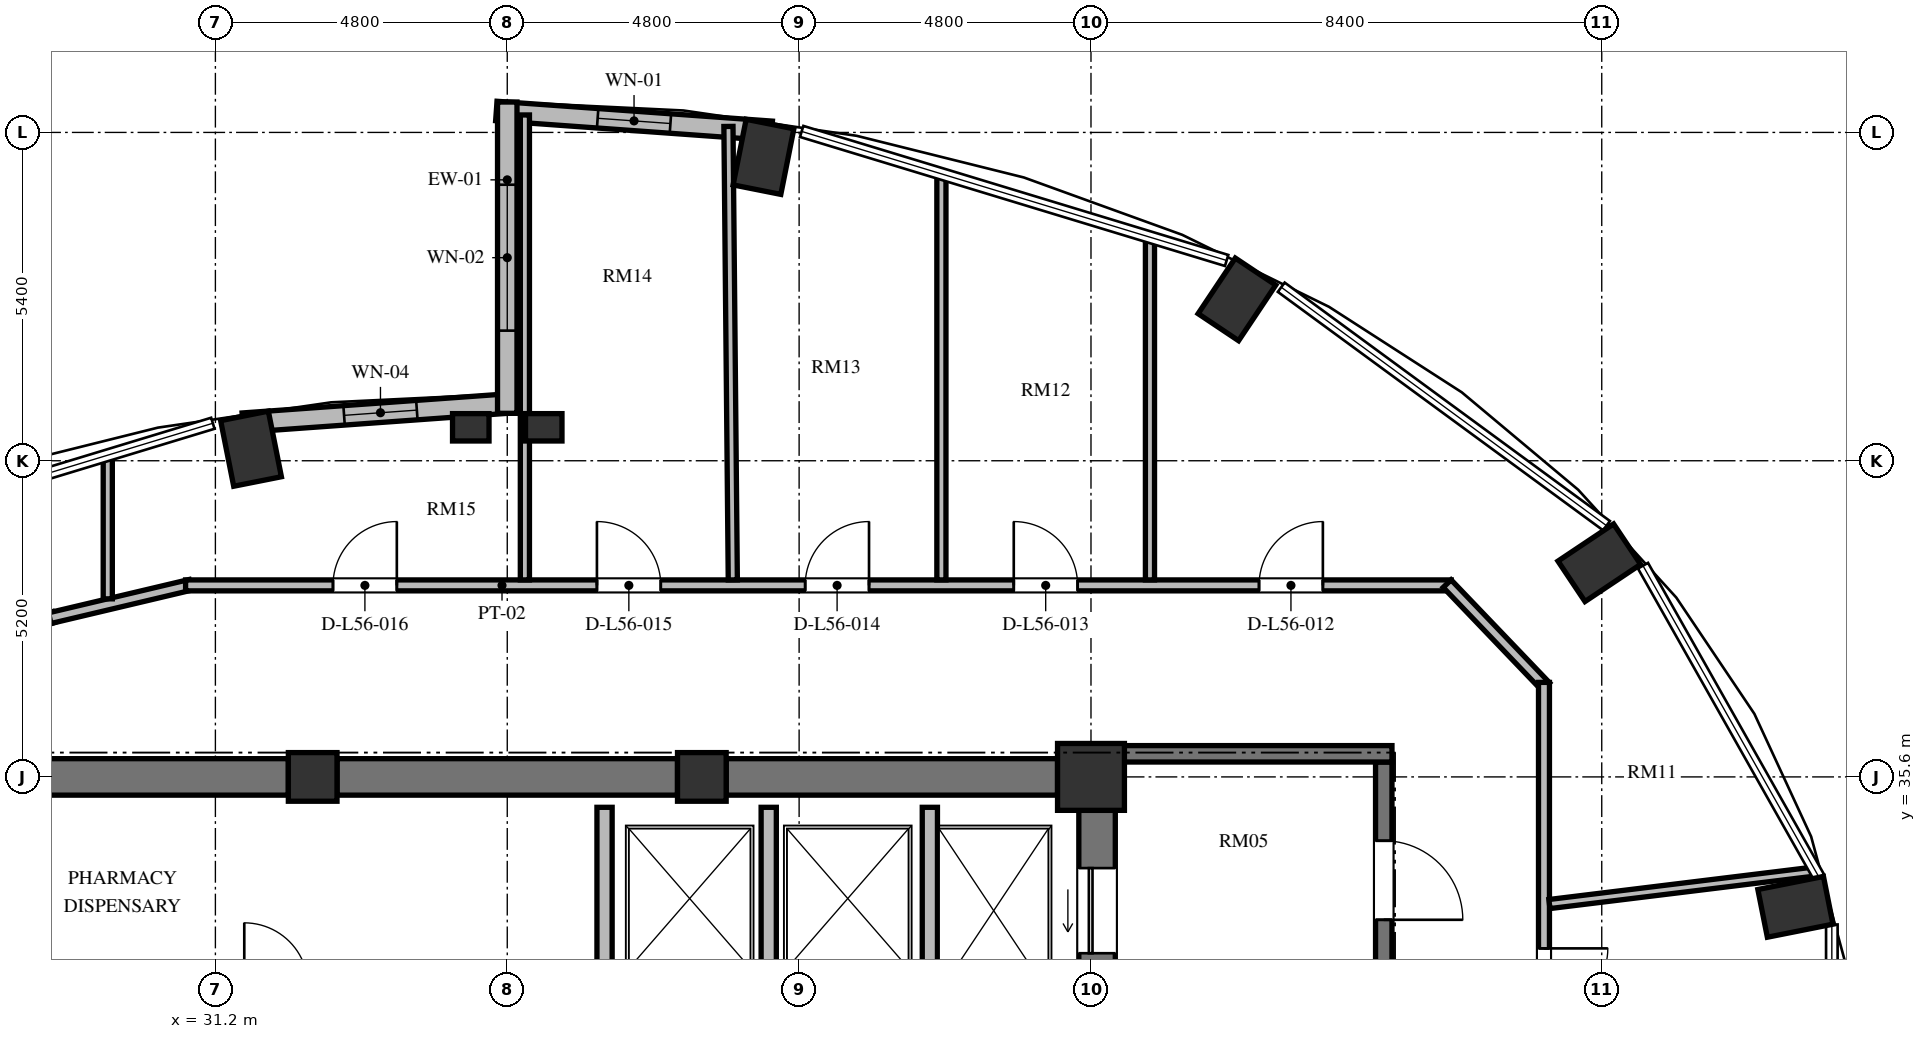
"""IFC4 building model, lengths in metres.
Left out: names, types, materials, properties, quantities, classifications, styles, units other than length and angle.
Written with IfcOpenShell. Run it as: python <this file> out.ifc"""

import sys

from ifc_helpers import new_model, si_unit, direction, frame, frame_2d, origin, origin_2d, place, context, subcontext, project, spatial, rectangle, extrude, element, fill, save


model = new_model("IFC4")
c1 = context("Model", 3, precision=1e-05, world=origin(), true_north=direction((0.0, 1.0)))
c2 = subcontext(c1, "Body", "Model", "MODEL_VIEW")
j1 = project(units=[si_unit("LENGTHUNIT", "METRE"), si_unit("PLANEANGLEUNIT", "RADIAN")], contexts=[c1])
p1 = place(None, origin())
s1 = spatial("IfcSite", under=j1, at=p1, CompositionType="ELEMENT")
p2 = place(p1, origin())
s2 = spatial("IfcBuilding", under=s1, at=p2, CompositionType="ELEMENT")
p3 = place(p2, frame((0.0, 0.0, 216.72)))
s3 = spatial("IfcBuildingStorey", under=s2, at=p3, CompositionType="ELEMENT", Elevation=216.72)
for number, where, z_axis, x_axis in (
    (1, (57.185, 33.463, 0.0), (0.0, 0.0, 1.0), (0.981, 0.195, 0.0)),
    (2, (53.96, 39.123, 0.0), (0.0, 0.0, 1.0), (0.831, 0.556, 0.0)),
    (3, (48.0, 43.454, 0.0), (0.0, 0.0, 1.0), (0.556, 0.831, 0.0)),
    (4, (40.214, 45.798, 0.0), (0.0, 0.0, 1.0), (0.195, 0.981, 0.0)),
    (5, (31.786, 40.998, 0.0), (0.0, 0.0, 1.0), (-0.195, 0.981, 0.0)),
):
    element("IfcColumn", number, at=place(p3, frame(where, z_axis=z_axis, x_axis=x_axis)), inside=s3, PredefinedType="COLUMN", context=c2, shape_type="SweptSolid", body=[
        extrude(rectangle(XDim=1.1, YDim=0.8, at=origin_2d()), origin(), (0.0, 0.0, 1.0), 3.648),
    ])
p4 = place(p3, frame((45.6, 35.6, 0.0), z_axis=(0.0, 0.0, 1.0), x_axis=(1.0, 0.0, 0.0)))
e6 = element("IfcColumn", 6, at=p4, inside=s3, PredefinedType="COLUMN", context=c2, shape_type="SweptSolid", body=[
    extrude(rectangle(XDim=1.1, YDim=1.1, at=origin_2d()), origin(), (0.0, 0.0, 1.0), 3.648),
])
for number, where, z_axis, x_axis in (
    (7, (39.2, 35.6, 0.0), (0.0, 0.0, 1.0), (1.0, 0.0, 0.0)),
    (8, (32.8, 35.6, 0.0), (0.0, 0.0, 1.0), (1.0, 0.0, 0.0)),
):
    element("IfcColumn", number, at=place(p3, frame(where, z_axis=z_axis, x_axis=x_axis)), inside=s3, PredefinedType="COLUMN", context=c2, shape_type="SweptSolid", body=[
        extrude(rectangle(XDim=0.8, YDim=0.8, at=origin_2d()), origin(), (0.0, 0.0, 1.0), 3.648),
    ])
for number, where, z_axis, x_axis in (
    (9, (35.4, 41.35, 0.0), (0.0, 0.0, 1.0), (1.0, 0.0, 0.0)),
    (10, (36.6, 41.35, 0.0), (0.0, 0.0, 1.0), (1.0, 0.0, 0.0)),
):
    element("IfcColumn", number, at=place(p3, frame(where, z_axis=z_axis, x_axis=x_axis)), inside=s3, PredefinedType="PILASTER", context=c2, shape_type="SweptSolid", body=[
        extrude(rectangle(XDim=0.6, YDim=0.45, at=origin_2d()), origin(), (0.0, 0.0, 1.0), 3.648),
    ])
p5 = place(p3, frame((45.7, 20.95, 0.0), z_axis=(0.0, 0.0, 1.0), x_axis=(0.0, 1.0, 0.0)))
e11 = element("IfcWall", 11, at=p5, inside=s3, PredefinedType="SHEAR", context=c2, shape_type="SweptSolid", body=[
    extrude(rectangle(XDim=14.1, YDim=0.6, at=frame_2d((7.05, 0.0))), origin(), (0.0, 0.0, 1.0), 3.648),
])
p6 = place(p5, frame((11.75, 0.0, 0.0)))
e12 = element("IfcOpeningElement", 12, at=p6, cuts=e11, PredefinedType="OPENING", context=c2, shape_type="SweptSolid", body=[
    extrude(rectangle(XDim=1.4, YDim=2.3, at=frame_2d((0.7, 1.15))), frame((0.0, 0.31, 0.0), z_axis=(0.0, -1.0, 0.0), x_axis=(1.0, 0.0, 0.0)), (0.0, 0.0, 1.0), 0.62),
])
p7 = place(p5, frame((0.95, 0.0, 0.0)))
e13 = element("IfcOpeningElement", 13, at=p7, cuts=e11, PredefinedType="OPENING", context=c2, shape_type="SweptSolid", body=[
    extrude(rectangle(XDim=1.4, YDim=2.3, at=frame_2d((0.7, 1.15))), frame((0.0, 0.31, 0.0), z_axis=(0.0, -1.0, 0.0), x_axis=(1.0, 0.0, 0.0)), (0.0, 0.0, 1.0), 0.62),
])
p8 = place(p3, frame((26.95, 35.6, 0.0), z_axis=(0.0, 0.0, 1.0), x_axis=(1.0, 0.0, 0.0)))
e14 = element("IfcWall", 14, at=p8, inside=s3, PredefinedType="SHEAR", context=c2, shape_type="SweptSolid", body=[
    extrude(rectangle(XDim=5.45, YDim=0.6, at=frame_2d((2.725, 0.0))), origin(), (0.0, 0.0, 1.0), 3.648),
])
p9 = place(p3, frame((33.2, 35.6, 0.0), z_axis=(0.0, 0.0, 1.0), x_axis=(1.0, 0.0, 0.0)))
e15 = element("IfcWall", 15, at=p9, inside=s3, PredefinedType="SHEAR", context=c2, shape_type="SweptSolid", body=[
    extrude(rectangle(XDim=5.6, YDim=0.6, at=frame_2d((2.8, 0.0))), origin(), (0.0, 0.0, 1.0), 3.648),
])
p10 = place(p3, frame((39.6, 35.6, 0.0), z_axis=(0.0, 0.0, 1.0), x_axis=(1.0, 0.0, 0.0)))
e16 = element("IfcWall", 16, at=p10, inside=s3, PredefinedType="SHEAR", context=c2, shape_type="SweptSolid", body=[
    extrude(rectangle(XDim=5.45, YDim=0.6, at=frame_2d((2.725, 0.0))), origin(), (0.0, 0.0, 1.0), 3.648),
])
p11 = place(p3, frame((40.35, 46.226, 0.0), z_axis=(0.0, 0.0, 1.0), x_axis=(-0.997409061056, 0.071938619141, 0.0)))
e17 = element("IfcWall", 17, at=p11, inside=s3, PredefinedType="SOLIDWALL", context=c2, shape_type="SweptSolid", body=[
    extrude(rectangle(XDim=4.541, YDim=0.32, at=frame_2d((2.271, 0.0))), origin(), (0.0, 0.0, 1.0), 3.448),
])
p12 = place(p11, frame((1.67, 0.0, 0.85)))
e18 = element("IfcOpeningElement", 18, at=p12, cuts=e17, PredefinedType="OPENING", context=c2, shape_type="SweptSolid", body=[
    extrude(rectangle(XDim=1.2, YDim=2.2, at=frame_2d((0.6, 1.1))), frame((0.0, 0.17, 0.0), z_axis=(0.0, -1.0, 0.0), x_axis=(1.0, 0.0, 0.0)), (0.0, 0.0, 1.0), 0.34),
])
p13 = place(p3, frame((36.179, 41.753, 0.0), z_axis=(0.0, 0.0, 1.0), x_axis=(-0.997408782787, -0.071942477163, 0.0)))
e19 = element("IfcWall", 19, at=p13, inside=s3, PredefinedType="SOLIDWALL", context=c2, shape_type="SweptSolid", body=[
    extrude(rectangle(XDim=4.541, YDim=0.32, at=frame_2d((2.27, 0.0))), origin(), (0.0, 0.0, 1.0), 3.448),
])
p14 = place(p13, frame((1.67, 0.0, 0.85)))
e20 = element("IfcOpeningElement", 20, at=p14, cuts=e19, PredefinedType="OPENING", context=c2, shape_type="SweptSolid", body=[
    extrude(rectangle(XDim=1.2, YDim=1.8, at=frame_2d((0.6, 0.9))), frame((0.0, 0.17, 0.0), z_axis=(0.0, -1.0, 0.0), x_axis=(1.0, 0.0, 0.0)), (0.0, 0.0, 1.0), 0.34),
])
p15 = place(p3, frame((36.0, 46.7, 0.0), z_axis=(0.0, 0.0, 1.0), x_axis=(0.0, -1.0, 0.0)))
e21 = element("IfcWall", 21, at=p15, inside=s3, PredefinedType="SOLIDWALL", context=c2, shape_type="SweptSolid", body=[
    extrude(rectangle(XDim=5.12, YDim=0.32, at=frame_2d((2.56, 0.0))), origin(), (0.0, 0.0, 1.0), 3.448),
])
p16 = place(p15, frame((1.36, 0.0, 0.84)))
e22 = element("IfcOpeningElement", 22, at=p16, cuts=e21, PredefinedType="OPENING", context=c2, shape_type="SweptSolid", body=[
    extrude(rectangle(XDim=2.4, YDim=2.04, at=frame_2d((1.2, 1.02))), frame((0.0, 0.17, 0.0), z_axis=(0.0, -1.0, 0.0), x_axis=(1.0, 0.0, 0.0)), (0.0, 0.0, 1.0), 0.34),
])
p17 = place(p3, frame((42.95, 31.92, 0.0), z_axis=(0.0, 0.0, 1.0), x_axis=(0.0, 1.0, 0.0)))
e23 = element("IfcWall", 23, at=p17, inside=s3, PredefinedType="SOLIDWALL", context=c2, shape_type="SweptSolid", body=[
    extrude(rectangle(XDim=3.18, YDim=0.25, at=frame_2d((1.59, 0.0))), origin(), (0.0, 0.0, 1.0), 3.448),
])
for number, where, z_axis, x_axis in (
    (24, (37.6, 32.42, 0.0), (0.0, 0.0, 1.0), (0.0, 1.0, 0.0)),
    (25, (40.3, 32.42, 0.0), (0.0, 0.0, 1.0), (0.0, 1.0, 0.0)),
):
    element("IfcWall", number, at=place(p3, frame(where, z_axis=z_axis, x_axis=x_axis)), inside=s3, PredefinedType="SOLIDWALL", context=c2, shape_type="SweptSolid", body=[
        extrude(rectangle(XDim=2.68, YDim=0.25, at=frame_2d((1.34, 0.0))), origin(), (0.0, 0.0, 1.0), 3.448),
    ])
p18 = place(p3, frame((50.415, 35.845, 0.0), z_axis=(0.0, 0.0, 1.0), x_axis=(0.0, -1.0, 0.0)))
e26 = element("IfcWall", 26, at=p18, inside=s3, PredefinedType="SHEAR", context=c2, shape_type="SweptSolid", body=[
    extrude(rectangle(XDim=15.825, YDim=0.27, at=frame_2d((7.913, 0.0))), origin(), (0.0, 0.0, 1.0), 3.648),
])
p19 = place(p18, frame((4.445, 0.0, 0.0)))
e27 = element("IfcOpeningElement", 27, at=p19, cuts=e26, PredefinedType="OPENING", context=c2, shape_type="SweptSolid", body=[
    extrude(rectangle(XDim=1.2, YDim=2.15, at=frame_2d((0.6, 1.075))), frame((0.0, 0.145, 0.0), z_axis=(0.0, -1.0, 0.0), x_axis=(1.0, 0.0, 0.0)), (0.0, 0.0, 1.0), 0.29),
])
p20 = place(p18, frame((1.295, 0.0, 0.0)))
e28 = element("IfcOpeningElement", 28, at=p20, cuts=e26, PredefinedType="OPENING", context=c2, shape_type="SweptSolid", body=[
    extrude(rectangle(XDim=1.3, YDim=2.2, at=frame_2d((0.65, 1.1))), frame((0.0, 0.145, 0.0), z_axis=(0.0, -1.0, 0.0), x_axis=(1.0, 0.0, 0.0)), (0.0, 0.0, 1.0), 0.29),
])
p21 = place(p18, frame((13.095, 0.0, 0.0)))
e29 = element("IfcOpeningElement", 29, at=p21, cuts=e26, PredefinedType="OPENING", context=c2, shape_type="SweptSolid", body=[
    extrude(rectangle(XDim=1.3, YDim=2.2, at=frame_2d((0.65, 1.1))), frame((0.0, 0.145, 0.0), z_axis=(0.0, -1.0, 0.0), x_axis=(1.0, 0.0, 0.0)), (0.0, 0.0, 1.0), 0.29),
])
p22 = place(p3, frame((46.0, 35.98, 0.0), z_axis=(0.0, 0.0, 1.0), x_axis=(1.0, 0.0, 0.0)))
e30 = element("IfcWall", 30, at=p22, inside=s3, PredefinedType="SHEAR", context=c2, shape_type="SweptSolid", body=[
    extrude(rectangle(XDim=4.55, YDim=0.27, at=frame_2d((2.275, 0.0))), origin(), (0.0, 0.0, 1.0), 3.648),
])
p23 = place(p3, frame((23.294, 36.422, 0.0), z_axis=(0.0, 0.0, 1.0), x_axis=(0.945493277461, 0.325641616316, 0.0)))
e31 = element("IfcWall", 31, at=p23, inside=s3, PredefinedType="PARTITIONING", context=c2, shape_type="SweptSolid", body=[
    extrude(rectangle(XDim=5.562, YDim=0.18, at=frame_2d((2.781, 0.0))), origin(), (0.0, 0.0, 1.0), 3.073),
])
p24 = place(p3, frame((28.476, 38.211, 0.0), z_axis=(0.0, 0.0, 1.0), x_axis=(0.973030562203, 0.230676234189, 0.0)))
e32 = element("IfcWall", 32, at=p24, inside=s3, PredefinedType="PARTITIONING", context=c2, shape_type="SweptSolid", body=[
    extrude(rectangle(XDim=2.377, YDim=0.18, at=frame_2d((1.188, 0.0))), origin(), (0.0, 0.0, 1.0), 3.448),
])
p25 = place(p3, frame((30.71, 38.75, 0.0), z_axis=(0.0, 0.0, 1.0), x_axis=(1.0, 0.0, 0.0)))
e33 = element("IfcWall", 33, at=p25, inside=s3, PredefinedType="PARTITIONING", context=c2, shape_type="SweptSolid", body=[
    extrude(rectangle(XDim=20.815, YDim=0.18, at=frame_2d((10.408, 0.0))), origin(), (0.0, 0.0, 1.0), 3.073),
])
p26 = place(p25, frame((17.654, 0.0, 0.0)))
e34 = element("IfcOpeningElement", 34, at=p26, cuts=e33, PredefinedType="OPENING", context=c2, shape_type="SweptSolid", body=[
    extrude(rectangle(XDim=1.05, YDim=2.15, at=frame_2d((0.525, 1.075))), frame((0.0, 0.1, 0.0), z_axis=(0.0, -1.0, 0.0), x_axis=(1.0, 0.0, 0.0)), (0.0, 0.0, 1.0), 0.2),
])
p27 = place(p25, frame((13.62, 0.0, 0.0)))
e35 = element("IfcOpeningElement", 35, at=p27, cuts=e33, PredefinedType="OPENING", context=c2, shape_type="SweptSolid", body=[
    extrude(rectangle(XDim=1.05, YDim=2.15, at=frame_2d((0.525, 1.075))), frame((0.0, 0.1, 0.0), z_axis=(0.0, -1.0, 0.0), x_axis=(1.0, 0.0, 0.0)), (0.0, 0.0, 1.0), 0.2),
])
p28 = place(p25, frame((10.19, 0.0, 0.0)))
e36 = element("IfcOpeningElement", 36, at=p28, cuts=e33, PredefinedType="OPENING", context=c2, shape_type="SweptSolid", body=[
    extrude(rectangle(XDim=1.05, YDim=2.15, at=frame_2d((0.525, 1.075))), frame((0.0, 0.1, 0.0), z_axis=(0.0, -1.0, 0.0), x_axis=(1.0, 0.0, 0.0)), (0.0, 0.0, 1.0), 0.2),
])
p29 = place(p25, frame((6.765, 0.0, 0.0)))
e37 = element("IfcOpeningElement", 37, at=p29, cuts=e33, PredefinedType="OPENING", context=c2, shape_type="SweptSolid", body=[
    extrude(rectangle(XDim=1.05, YDim=2.15, at=frame_2d((0.525, 1.075))), frame((0.0, 0.1, 0.0), z_axis=(0.0, -1.0, 0.0), x_axis=(1.0, 0.0, 0.0)), (0.0, 0.0, 1.0), 0.2),
])
p30 = place(p25, frame((2.424, 0.0, 0.0)))
e38 = element("IfcOpeningElement", 38, at=p30, cuts=e33, PredefinedType="OPENING", context=c2, shape_type="SweptSolid", body=[
    extrude(rectangle(XDim=1.05, YDim=2.15, at=frame_2d((0.525, 1.075))), frame((0.0, 0.1, 0.0), z_axis=(0.0, -1.0, 0.0), x_axis=(1.0, 0.0, 0.0)), (0.0, 0.0, 1.0), 0.2),
])
p31 = place(p3, frame((51.458, 38.779, 0.0), z_axis=(0.0, 0.0, 1.0), x_axis=(0.691359830363, -0.722510612352, 0.0)))
e39 = element("IfcWall", 39, at=p31, inside=s3, PredefinedType="PARTITIONING", context=c2, shape_type="SweptSolid", body=[
    extrude(rectangle(XDim=2.343, YDim=0.18, at=frame_2d((1.172, 0.0))), origin(), (0.0, 0.0, 1.0), 3.033),
])
p32 = place(p3, frame((53.05, 37.155, 0.0), z_axis=(0.0, 0.0, 1.0), x_axis=(0.0, -1.0, 0.0)))
e40 = element("IfcWall", 40, at=p32, inside=s3, PredefinedType="PARTITIONING", context=c2, shape_type="SweptSolid", body=[
    extrude(rectangle(XDim=13.509, YDim=0.18, at=frame_2d((6.754, 0.0))), origin(), (0.0, 0.0, 1.0), 3.448),
])
p33 = place(p32, frame((10.398, 0.0, 0.0)))
e41 = element("IfcOpeningElement", 41, at=p33, cuts=e40, PredefinedType="OPENING", context=c2, shape_type="SweptSolid", body=[
    extrude(rectangle(XDim=1.05, YDim=2.15, at=frame_2d((0.525, 1.075))), frame((0.0, 0.1, 0.0), z_axis=(0.0, -1.0, 0.0), x_axis=(1.0, 0.0, 0.0)), (0.0, 0.0, 1.0), 0.2),
])
p34 = place(p32, frame((6.705, 0.0, 0.0)))
e42 = element("IfcOpeningElement", 42, at=p34, cuts=e40, PredefinedType="OPENING", context=c2, shape_type="SweptSolid", body=[
    extrude(rectangle(XDim=1.4, YDim=2.2, at=frame_2d((0.7, 1.1))), frame((0.0, 0.1, 0.0), z_axis=(0.0, -1.0, 0.0), x_axis=(1.0, 0.0, 0.0)), (0.0, 0.0, 1.0), 0.2),
])
p35 = place(p32, frame((4.375, 0.0, 0.0)))
e43 = element("IfcOpeningElement", 43, at=p35, cuts=e40, PredefinedType="OPENING", context=c2, shape_type="SweptSolid", body=[
    extrude(rectangle(XDim=1.05, YDim=2.15, at=frame_2d((0.525, 1.075))), frame((0.0, 0.1, 0.0), z_axis=(0.0, -1.0, 0.0), x_axis=(1.0, 0.0, 0.0)), (0.0, 0.0, 1.0), 0.2),
])
p36 = place(p3, frame((53.139, 33.509, 0.0), z_axis=(0.0, 0.0, 1.0), x_axis=(0.992571001818, 0.121666784083, 0.0)))
e44 = element("IfcWall", 44, at=p36, inside=s3, PredefinedType="PARTITIONING", context=c2, shape_type="SweptSolid", body=[
    extrude(rectangle(XDim=4.417, YDim=0.15, at=frame_2d((2.208, 0.0))), origin(), (0.0, 0.0, 1.0), 3.448),
])
p37 = place(p3, frame((29.43, 38.529, 0.0), z_axis=(0.0, 0.0, 1.0), x_axis=(0.0, 1.0, 0.0)))
e45 = element("IfcWall", 45, at=p37, inside=s3, PredefinedType="PARTITIONING", context=c2, shape_type="SweptSolid", body=[
    extrude(rectangle(XDim=2.346, YDim=0.15, at=frame_2d((1.173, 0.0))), origin(), (0.0, 0.0, 1.0), 3.448),
])
p38 = place(p3, frame((36.29, 38.84, 0.0), z_axis=(0.0, 0.0, 1.0), x_axis=(0.0, 1.0, 0.0)))
e46 = element("IfcWall", 46, at=p38, inside=s3, PredefinedType="PARTITIONING", context=c2, shape_type="SweptSolid", body=[
    extrude(rectangle(XDim=7.647, YDim=0.15, at=frame_2d((3.824, 0.0))), origin(), (0.0, 0.0, 1.0), 3.448),
])
p39 = place(p3, frame((39.709, 38.84, 0.0), z_axis=(0.0, 0.0, 1.0), x_axis=(-0.009590393625, 0.999954011118, 0.0)))
e47 = element("IfcWall", 47, at=p39, inside=s3, PredefinedType="PARTITIONING", context=c2, shape_type="SweptSolid", body=[
    extrude(rectangle(XDim=7.459, YDim=0.15, at=frame_2d((3.729, 0.0))), origin(), (0.0, 0.0, 1.0), 2.933),
])
p40 = place(p3, frame((43.14, 38.84, 0.0), z_axis=(0.0, 0.0, 1.0), x_axis=(0.0, 1.0, 0.0)))
e48 = element("IfcWall", 48, at=p40, inside=s3, PredefinedType="PARTITIONING", context=c2, shape_type="SweptSolid", body=[
    extrude(rectangle(XDim=6.662, YDim=0.15, at=frame_2d((3.331, 0.0))), origin(), (0.0, 0.0, 1.0), 3.448),
])
p41 = place(p3, frame((46.57, 38.84, 0.0), z_axis=(0.0, 0.0, 1.0), x_axis=(0.0, 1.0, 0.0)))
e49 = element("IfcWall", 49, at=p41, inside=s3, PredefinedType="PARTITIONING", context=c2, shape_type="SweptSolid", body=[
    extrude(rectangle(XDim=5.62, YDim=0.15, at=frame_2d((2.81, 0.0))), origin(), (0.0, 0.0, 1.0), 3.448),
])
p42 = place(p12, origin())
e50 = element("IfcWindow", 50, at=p42, inside=s3, PartitioningType="SINGLE_PANEL", PredefinedType="WINDOW", context=c2, shape_type="SweptSolid", body=[
    extrude(rectangle(XDim=1.2, YDim=2.2, at=frame_2d((0.6, 1.1))), frame((0.0, 0.03, 0.0), z_axis=(0.0, -1.0, 0.0), x_axis=(1.0, 0.0, 0.0)), (0.0, 0.0, 1.0), 0.06),
])
fill(e18, e50)
p43 = place(p14, origin())
e51 = element("IfcWindow", 51, at=p43, inside=s3, PartitioningType="SINGLE_PANEL", PredefinedType="WINDOW", context=c2, shape_type="SweptSolid", body=[
    extrude(rectangle(XDim=1.2, YDim=1.8, at=frame_2d((0.6, 0.9))), frame((0.0, 0.03, 0.0), z_axis=(0.0, -1.0, 0.0), x_axis=(1.0, 0.0, 0.0)), (0.0, 0.0, 1.0), 0.06),
])
fill(e20, e51)
p44 = place(p16, origin())
e52 = element("IfcWindow", 52, at=p44, inside=s3, PartitioningType="SINGLE_PANEL", PredefinedType="WINDOW", context=c2, shape_type="SweptSolid", body=[
    extrude(rectangle(XDim=2.4, YDim=2.04, at=frame_2d((1.2, 1.02))), frame((0.0, 0.03, 0.0), z_axis=(0.0, -1.0, 0.0), x_axis=(1.0, 0.0, 0.0)), (0.0, 0.0, 1.0), 0.06),
])
fill(e22, e52)
p45 = place(p6, origin())
e53 = element("IfcDoor", 53, at=p45, inside=s3, OperationType="SLIDING_TO_LEFT", PredefinedType="DOOR", context=c2, shape_type="SweptSolid", body=[
    extrude(rectangle(XDim=1.4, YDim=2.3, at=frame_2d((0.7, 1.15))), frame((0.0, 0.025, 0.0), z_axis=(0.0, -1.0, 0.0), x_axis=(1.0, 0.0, 0.0)), (0.0, 0.0, 1.0), 0.05),
])
fill(e12, e53)
p46 = place(p20, origin())
e54 = element("IfcDoor", 54, at=p46, inside=s3, OperationType="SINGLE_SWING_RIGHT", PredefinedType="DOOR", context=c2, shape_type="SweptSolid", body=[
    extrude(rectangle(XDim=1.3, YDim=2.2, at=frame_2d((0.65, 1.1))), frame((0.0, 0.025, 0.0), z_axis=(0.0, -1.0, 0.0), x_axis=(1.0, 0.0, 0.0)), (0.0, 0.0, 1.0), 0.05),
])
fill(e28, e54)
p47 = place(p35, origin())
e55 = element("IfcDoor", 55, at=p47, inside=s3, OperationType="SINGLE_SWING_LEFT", PredefinedType="DOOR", context=c2, shape_type="SweptSolid", body=[
    extrude(rectangle(XDim=1.05, YDim=2.15, at=frame_2d((0.525, 1.075))), frame((0.0, 0.025, 0.0), z_axis=(0.0, -1.0, 0.0), x_axis=(1.0, 0.0, 0.0)), (0.0, 0.0, 1.0), 0.05),
])
fill(e43, e55)
p48 = place(p26, origin())
e56 = element("IfcDoor", 56, at=p48, inside=s3, OperationType="SINGLE_SWING_RIGHT", PredefinedType="DOOR", context=c2, shape_type="SweptSolid", body=[
    extrude(rectangle(XDim=1.05, YDim=2.15, at=frame_2d((0.525, 1.075))), frame((0.0, 0.025, 0.0), z_axis=(0.0, -1.0, 0.0), x_axis=(1.0, 0.0, 0.0)), (0.0, 0.0, 1.0), 0.05),
])
fill(e34, e56)
p49 = place(p27, origin())
e57 = element("IfcDoor", 57, at=p49, inside=s3, OperationType="SINGLE_SWING_LEFT", PredefinedType="DOOR", context=c2, shape_type="SweptSolid", body=[
    extrude(rectangle(XDim=1.05, YDim=2.15, at=frame_2d((0.525, 1.075))), frame((0.0, 0.025, 0.0), z_axis=(0.0, -1.0, 0.0), x_axis=(1.0, 0.0, 0.0)), (0.0, 0.0, 1.0), 0.05),
])
fill(e35, e57)
p50 = place(p28, origin())
e58 = element("IfcDoor", 58, at=p50, inside=s3, OperationType="SINGLE_SWING_RIGHT", PredefinedType="DOOR", context=c2, shape_type="SweptSolid", body=[
    extrude(rectangle(XDim=1.05, YDim=2.15, at=frame_2d((0.525, 1.075))), frame((0.0, 0.025, 0.0), z_axis=(0.0, -1.0, 0.0), x_axis=(1.0, 0.0, 0.0)), (0.0, 0.0, 1.0), 0.05),
])
fill(e36, e58)
p51 = place(p29, origin())
e59 = element("IfcDoor", 59, at=p51, inside=s3, OperationType="SINGLE_SWING_LEFT", PredefinedType="DOOR", context=c2, shape_type="SweptSolid", body=[
    extrude(rectangle(XDim=1.05, YDim=2.15, at=frame_2d((0.525, 1.075))), frame((0.0, 0.025, 0.0), z_axis=(0.0, -1.0, 0.0), x_axis=(1.0, 0.0, 0.0)), (0.0, 0.0, 1.0), 0.05),
])
fill(e37, e59)
p52 = place(p30, origin())
e60 = element("IfcDoor", 60, at=p52, inside=s3, OperationType="SINGLE_SWING_RIGHT", PredefinedType="DOOR", context=c2, shape_type="SweptSolid", body=[
    extrude(rectangle(XDim=1.05, YDim=2.15, at=frame_2d((0.525, 1.075))), frame((0.0, 0.025, 0.0), z_axis=(0.0, -1.0, 0.0), x_axis=(1.0, 0.0, 0.0)), (0.0, 0.0, 1.0), 0.05),
])
fill(e38, e60)
save(model, sys.argv[1])
